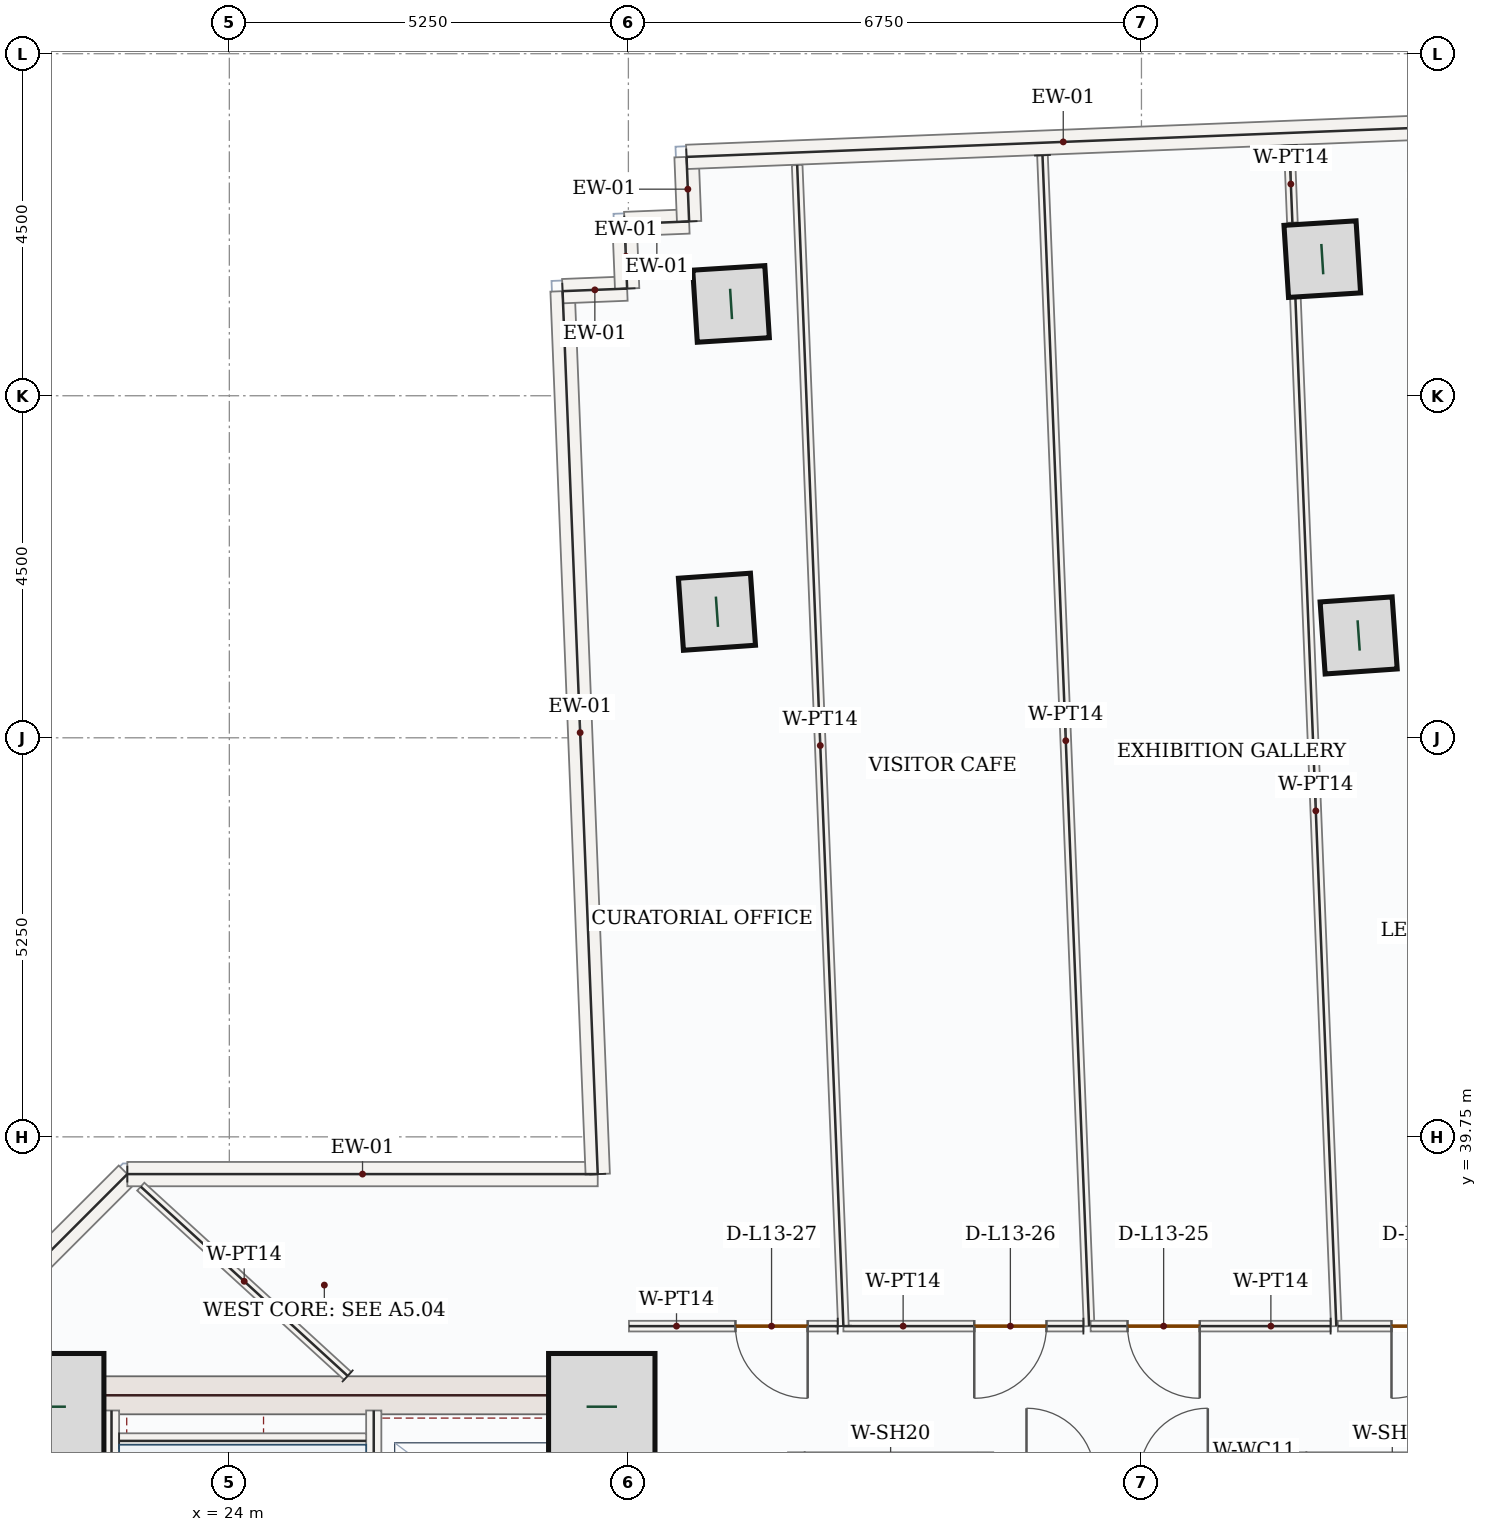
"""IFC4 building model, lengths in metres.
Left out: names, types, materials, properties, quantities, classifications, styles, units other than length and angle.
Written with IfcOpenShell. Run it as: python <this file> out.ifc"""

import sys

from ifc_helpers import new_model, si_unit, direction, frame, frame_2d, origin, origin_2d, place, context, subcontext, project, spatial, rectangle, hollow_rectangle, extrude, source, transform, mapped, element, fill, save


model = new_model("IFC4")
c1 = context("Model", 3, precision=1e-05, world=origin(), true_north=direction((0.0, 1.0)))
c2 = subcontext(c1, "Body", "Model", "MODEL_VIEW")
j1 = project(units=[si_unit("LENGTHUNIT", "METRE"), si_unit("PLANEANGLEUNIT", "RADIAN")], contexts=[c1])
p1 = place(None, origin())
s1 = spatial("IfcSite", under=j1, at=p1, CompositionType="ELEMENT")
p2 = place(p1, origin())
s2 = spatial("IfcBuilding", under=s1, at=p2, CompositionType="ELEMENT")
p3 = place(p2, frame((0.0, 0.0, 62.7)))
s3 = spatial("IfcBuildingStorey", under=s2, at=p3, CompositionType="ELEMENT", Elevation=62.7)
m1 = source(origin(), c2, "Body", "SweptSolid", [
    extrude(rectangle(XDim=8.55, YDim=0.5, at=frame_2d((4.275, 0.0))), origin(), (0.0, 0.0, 1.0), 3.95),
])
p4 = place(p3, frame((21.5, 28.05, 0.0), z_axis=(0.0, 0.0, 1.0), x_axis=(0.0, 1.0, 0.0)))
e1 = element("IfcWall", 1, at=p4, inside=s3, PredefinedType="SHEAR", context=c2, shape_type="MappedRepresentation", body=[
    mapped(m1, transform((0.0, 0.0, 0.0), x_axis=(1.0, 0.0, 0.0), y_axis=(0.0, 1.0, 0.0), z_axis=(0.0, 0.0, 1.0), scale=1.0)),
])
p5 = place(p3, frame((29.0, 28.05, 0.0), z_axis=(0.0, 0.0, 1.0), x_axis=(0.0, 1.0, 0.0)))
e2 = element("IfcWall", 2, at=p5, inside=s3, PredefinedType="SHEAR", context=c2, shape_type="SweptSolid", body=[
    extrude(rectangle(XDim=8.55, YDim=0.5, at=frame_2d((4.275, 0.0))), origin(), (0.0, 0.0, 1.0), 3.95),
])
p6 = place(p5, frame((1.5, 0.0, 0.0)))
e3 = element("IfcOpeningElement", 3, at=p6, cuts=e2, PredefinedType="OPENING", context=c2, shape_type="SweptSolid", body=[
    extrude(rectangle(XDim=1.1, YDim=2.2, at=frame_2d((0.55, 1.1))), frame((0.0, 0.26, 0.0), z_axis=(0.0, -1.0, 0.0), x_axis=(1.0, 0.0, 0.0)), (0.0, 0.0, 1.0), 0.52),
])
m2 = source(origin(), c2, "Body", "SweptSolid", [
    extrude(rectangle(XDim=7.0, YDim=0.5, at=frame_2d((3.5, 0.0))), origin(), (0.0, 0.0, 1.0), 3.95),
])
p7 = place(p3, frame((21.75, 36.35, 0.0), z_axis=(0.0, 0.0, 1.0), x_axis=(1.0, 0.0, 0.0)))
e4 = element("IfcWall", 4, at=p7, inside=s3, PredefinedType="SHEAR", context=c2, shape_type="MappedRepresentation", body=[
    mapped(m2, transform((0.0, 0.0, 0.0), x_axis=(1.0, 0.0, 0.0), y_axis=(0.0, 1.0, 0.0), z_axis=(0.0, 0.0, 1.0), scale=1.0)),
])
m3 = source(origin(), c2, "Body", "SweptSolid", [
    extrude(rectangle(XDim=1.4, YDim=1.4, at=origin_2d()), origin(), (0.0, 0.0, 1.0), 4.2),
])
for number, where, z_axis, x_axis in (
    (5, (21.65, 36.2, 0.0), (0.0, 0.0, 1.0), (1.0, 0.0, 0.0)),
    (6, (28.9, 36.2, 0.0), (0.0, 0.0, 1.0), (1.0, 0.0, 0.0)),
):
    element("IfcColumn", number, at=place(p3, frame(where, z_axis=z_axis, x_axis=x_axis)), inside=s3, PredefinedType="COLUMN", context=c2, shape_type="MappedRepresentation", body=[
        mapped(m3, transform((0.0, 0.0, 0.0), x_axis=(1.0, 0.0, 0.0), y_axis=(0.0, 1.0, 0.0), z_axis=(0.0, 0.0, 1.0), scale=1.0)),
    ])
m4 = source(origin(), c2, "Body", "SweptSolid", [
    extrude(hollow_rectangle(XDim=0.95, YDim=0.95, WallThickness=0.05, at=origin_2d()), origin(), (0.0, 0.0, 1.0), 4.2),
])
for number, where, z_axis, x_axis in (
    (7, (38.857, 46.346, 0.0), (0.0, 0.0, 1.0), (-0.07, 0.998, 0.0)),
    (8, (30.415, 46.658, 0.0), (0.0, 0.0, 1.0), (-0.07, 0.998, 0.0)),
    (9, (38.379, 51.297, 0.0), (0.0, 0.0, 1.0), (-0.063, 0.998, 0.0)),
    (10, (30.601, 50.708, 0.0), (0.0, 0.0, 1.0), (-0.063, 0.998, 0.0)),
):
    element("IfcColumn", number, at=place(p3, frame(where, z_axis=z_axis, x_axis=x_axis)), inside=s3, PredefinedType="COLUMN", context=c2, shape_type="MappedRepresentation", body=[
        mapped(m4, transform((0.0, 0.0, 0.0), x_axis=(1.0, 0.0, 0.0), y_axis=(0.0, 1.0, 0.0), z_axis=(0.0, 0.0, 1.0), scale=1.0)),
    ])
m5 = source(origin(), c2, "Body", "SweptSolid", [
    extrude(rectangle(XDim=5.258, YDim=0.32, at=frame_2d((2.629, 0.0))), origin(), (0.0, 0.0, 1.0), 3.95),
])
p8 = place(p3, frame((18.94, 35.542, 0.0), z_axis=(0.0, 0.0, 1.0), x_axis=(0.707106781187, 0.707106781187, 0.0)))
e11 = element("IfcWall", 11, at=p8, inside=s3, PredefinedType="SOLIDWALL", context=c2, shape_type="MappedRepresentation", body=[
    mapped(m5, transform((0.0, 0.0, 0.0), x_axis=(1.0, 0.0, 0.0), y_axis=(0.0, 1.0, 0.0), z_axis=(0.0, 0.0, 1.0), scale=1.0)),
])
m6 = source(origin(), c2, "Body", "SweptSolid", [
    extrude(rectangle(XDim=6.189, YDim=0.32, at=frame_2d((3.094, 0.0))), origin(), (0.0, 0.0, 1.0), 3.95),
])
p9 = place(p3, frame((22.658, 39.26, 0.0), z_axis=(0.0, 0.0, 1.0), x_axis=(1.0, 0.0, 0.0)))
e12 = element("IfcWall", 12, at=p9, inside=s3, PredefinedType="SOLIDWALL", context=c2, shape_type="MappedRepresentation", body=[
    mapped(m6, transform((0.0, 0.0, 0.0), x_axis=(1.0, 0.0, 0.0), y_axis=(0.0, 1.0, 0.0), z_axis=(0.0, 0.0, 1.0), scale=1.0)),
])
m7 = source(origin(), c2, "Body", "SweptSolid", [
    extrude(rectangle(XDim=11.625, YDim=0.32, at=frame_2d((5.812, 0.0))), origin(), (0.0, 0.0, 1.0), 3.95),
])
p10 = place(p3, frame((28.847, 39.26, 0.0), z_axis=(0.0, 0.0, 1.0), x_axis=(-0.039775975357, 0.999208622753, 0.0)))
e13 = element("IfcWall", 13, at=p10, inside=s3, PredefinedType="SOLIDWALL", context=c2, shape_type="MappedRepresentation", body=[
    mapped(m7, transform((0.0, 0.0, 0.0), x_axis=(1.0, 0.0, 0.0), y_axis=(0.0, 1.0, 0.0), z_axis=(0.0, 0.0, 1.0), scale=1.0)),
])
m8 = source(origin(), c2, "Body", "SweptSolid", [
    extrude(rectangle(XDim=0.85, YDim=0.32, at=frame_2d((0.425, 0.0))), origin(), (0.0, 0.0, 1.0), 3.95),
])
for number, where, z_axis, x_axis in (
    (14, (28.384, 50.876, 0.0), (0.0, 0.0, 1.0), (0.999, 0.04, 0.0)),
    (15, (29.233, 50.91, 0.0), (0.0, 0.0, 1.0), (-0.04, 0.999, 0.0)),
):
    element("IfcWall", number, at=place(p3, frame(where, z_axis=z_axis, x_axis=x_axis)), inside=s3, PredefinedType="SOLIDWALL", context=c2, shape_type="MappedRepresentation", body=[
        mapped(m8, transform((0.0, 0.0, 0.0), x_axis=(1.0, 0.0, 0.0), y_axis=(0.0, 1.0, 0.0), z_axis=(0.0, 0.0, 1.0), scale=1.0)),
    ])
m9 = source(origin(), c2, "Body", "SweptSolid", [
    extrude(rectangle(XDim=0.85, YDim=0.32, at=frame_2d((0.425, 0.0))), origin(), (0.0, 0.0, 1.0), 3.95),
])
p11 = place(p3, frame((29.2, 51.759, 0.0), z_axis=(0.0, 0.0, 1.0), x_axis=(0.999202792875, 0.039922158152, 0.0)))
e16 = element("IfcWall", 16, at=p11, inside=s3, PredefinedType="SOLIDWALL", context=c2, shape_type="MappedRepresentation", body=[
    mapped(m9, transform((0.0, 0.0, 0.0), x_axis=(1.0, 0.0, 0.0), y_axis=(0.0, 1.0, 0.0), z_axis=(0.0, 0.0, 1.0), scale=1.0)),
])
p12 = place(p3, frame((30.049, 51.793, 0.0), z_axis=(0.0, 0.0, 1.0), x_axis=(-0.039933618331, 0.999202334929, 0.0)))
e17 = element("IfcWall", 17, at=p12, inside=s3, PredefinedType="SOLIDWALL", context=c2, shape_type="MappedRepresentation", body=[
    mapped(m8, transform((0.0, 0.0, 0.0), x_axis=(1.0, 0.0, 0.0), y_axis=(0.0, 1.0, 0.0), z_axis=(0.0, 0.0, 1.0), scale=1.0)),
])
m10 = source(origin(), c2, "Body", "SweptSolid", [
    extrude(rectangle(XDim=9.92, YDim=0.32, at=frame_2d((4.96, 0.0))), origin(), (0.0, 0.0, 1.0), 3.95),
])
p13 = place(p3, frame((30.015, 52.642, 0.0), z_axis=(0.0, 0.0, 1.0), x_axis=(0.999207823998, 0.039796035749, 0.0)))
e18 = element("IfcWall", 18, at=p13, inside=s3, PredefinedType="SOLIDWALL", context=c2, shape_type="MappedRepresentation", body=[
    mapped(m10, transform((0.0, 0.0, 0.0), x_axis=(1.0, 0.0, 0.0), y_axis=(0.0, 1.0, 0.0), z_axis=(0.0, 0.0, 1.0), scale=1.0)),
])
m11 = source(origin(), c2, "Body", "SweptSolid", [
    extrude(rectangle(XDim=7.87, YDim=0.2, at=frame_2d((3.935, 0.0))), origin(), (0.0, 0.0, 1.0), 3.95),
])
p14 = place(p3, frame((22.45, 28.28, 0.0), z_axis=(0.0, 0.0, 1.0), x_axis=(0.0, 1.0, 0.0)))
e19 = element("IfcWall", 19, at=p14, inside=s3, PredefinedType="SOLIDWALL", context=c2, shape_type="MappedRepresentation", body=[
    mapped(m11, transform((0.0, 0.0, 0.0), x_axis=(1.0, 0.0, 0.0), y_axis=(0.0, 1.0, 0.0), z_axis=(0.0, 0.0, 1.0), scale=1.0)),
])
p15 = place(p3, frame((25.9, 28.15, 0.0), z_axis=(0.0, 0.0, 1.0), x_axis=(0.0, 1.0, 0.0)))
e20 = element("IfcWall", 20, at=p15, inside=s3, PredefinedType="SOLIDWALL", context=c2, shape_type="SweptSolid", body=[
    extrude(rectangle(XDim=8.0, YDim=0.2, at=frame_2d((4.0, 0.0))), origin(), (0.0, 0.0, 1.0), 3.95),
])
p16 = place(p15, frame((0.4, 0.0, 0.0)))
e21 = element("IfcOpeningElement", 21, at=p16, cuts=e20, PredefinedType="OPENING", context=c2, shape_type="SweptSolid", body=[
    extrude(rectangle(XDim=1.05, YDim=2.15, at=frame_2d((0.525, 1.075))), frame((0.0, 0.11, 0.0), z_axis=(0.0, -1.0, 0.0), x_axis=(1.0, 0.0, 0.0)), (0.0, 0.0, 1.0), 0.22),
])
m12 = source(origin(), c2, "Body", "SweptSolid", [
    extrude(rectangle(XDim=3.25, YDim=0.2, at=frame_2d((1.625, 0.0))), origin(), (0.0, 0.0, 1.0), 3.95),
])
p17 = place(p3, frame((22.55, 35.75, 0.0), z_axis=(0.0, 0.0, 1.0), x_axis=(1.0, 0.0, 0.0)))
e22 = element("IfcWall", 22, at=p17, inside=s3, PredefinedType="SOLIDWALL", context=c2, shape_type="MappedRepresentation", body=[
    mapped(m12, transform((0.0, 0.0, 0.0), x_axis=(1.0, 0.0, 0.0), y_axis=(0.0, 1.0, 0.0), z_axis=(0.0, 0.0, 1.0), scale=1.0)),
])
m13 = source(origin(), c2, "Body", "SweptSolid", [
    extrude(rectangle(XDim=2.4, YDim=0.2, at=frame_2d((1.2, 0.0))), origin(), (0.0, 0.0, 1.0), 3.95),
])
for number, where, z_axis, x_axis in (
    (23, (31.45, 33.2, 0.0), (0.0, 0.0, 1.0), (0.0, 1.0, 0.0)),
    (24, (33.95, 33.2, 0.0), (0.0, 0.0, 1.0), (0.0, 1.0, 0.0)),
    (25, (38.05, 33.2, 0.0), (0.0, 0.0, 1.0), (0.0, 1.0, 0.0)),
):
    element("IfcWall", number, at=place(p3, frame(where, z_axis=z_axis, x_axis=x_axis)), inside=s3, PredefinedType="SOLIDWALL", context=c2, shape_type="MappedRepresentation", body=[
        mapped(m13, transform((0.0, 0.0, 0.0), x_axis=(1.0, 0.0, 0.0), y_axis=(0.0, 1.0, 0.0), z_axis=(0.0, 0.0, 1.0), scale=1.0)),
    ])
m14 = source(origin(), c2, "Body", "SweptSolid", [
    extrude(rectangle(XDim=15.416, YDim=0.14, at=frame_2d((7.708, 0.0))), origin(), (0.0, 0.0, 1.0), 3.95),
])
p18 = place(p3, frame((34.698, 52.664, 0.0), z_axis=(0.0, 0.0, 1.0), x_axis=(0.039782723686, -0.999208354096, 0.0)))
e26 = element("IfcWall", 26, at=p18, inside=s3, PredefinedType="PARTITIONING", context=c2, shape_type="MappedRepresentation", body=[
    mapped(m14, transform((0.0, 0.0, 0.0), x_axis=(1.0, 0.0, 0.0), y_axis=(0.0, 1.0, 0.0), z_axis=(0.0, 0.0, 1.0), scale=1.0)),
])
p19 = place(p3, frame((35.236, 37.26, 0.0), z_axis=(0.0, 0.0, 1.0), x_axis=(-1.0, 0.0, 0.0)))
e27 = element("IfcWall", 27, at=p19, inside=s3, PredefinedType="PARTITIONING", context=c2, shape_type="SweptSolid", body=[
    extrude(rectangle(XDim=3.157, YDim=0.14, at=frame_2d((1.579, 0.0))), origin(), (0.0, 0.0, 1.0), 3.95),
])
p20 = place(p19, frame((0.486, 0.0, 0.0)))
e28 = element("IfcOpeningElement", 28, at=p20, cuts=e27, PredefinedType="OPENING", context=c2, shape_type="SweptSolid", body=[
    extrude(rectangle(XDim=0.95, YDim=2.15, at=frame_2d((0.475, 1.075))), frame((0.0, 0.08, 0.0), z_axis=(0.0, -1.0, 0.0), x_axis=(1.0, 0.0, 0.0)), (0.0, 0.0, 1.0), 0.16),
])
m15 = source(origin(), c2, "Body", "SweptSolid", [
    extrude(rectangle(XDim=15.286, YDim=0.14, at=frame_2d((7.643, 0.0))), origin(), (0.0, 0.0, 1.0), 3.95),
])
p21 = place(p3, frame((32.079, 37.261, 0.0), z_axis=(0.0, 0.0, 1.0), x_axis=(-0.039769031662, 0.99920889914, 0.0)))
e29 = element("IfcWall", 29, at=p21, inside=s3, PredefinedType="PARTITIONING", context=c2, shape_type="MappedRepresentation", body=[
    mapped(m15, transform((0.0, 0.0, 0.0), x_axis=(1.0, 0.0, 0.0), y_axis=(0.0, 1.0, 0.0), z_axis=(0.0, 0.0, 1.0), scale=1.0)),
])
m16 = source(origin(), c2, "Body", "SweptSolid", [
    extrude(rectangle(XDim=1.016, YDim=0.14, at=frame_2d((0.508, 0.0))), origin(), (0.0, 0.0, 1.0), 3.95),
])
p22 = place(p3, frame((37.945, 52.793, 0.0), z_axis=(0.0, 0.0, 1.0), x_axis=(0.03988168596, -0.99920440908, 0.0)))
e30 = element("IfcWall", 30, at=p22, inside=s3, PredefinedType="PARTITIONING", context=c2, shape_type="MappedRepresentation", body=[
    mapped(m16, transform((0.0, 0.0, 0.0), x_axis=(1.0, 0.0, 0.0), y_axis=(0.0, 1.0, 0.0), z_axis=(0.0, 0.0, 1.0), scale=1.0)),
])
m17 = source(origin(), c2, "Body", "SweptSolid", [
    extrude(rectangle(XDim=13.568, YDim=0.14, at=frame_2d((6.784, 0.0))), origin(), (0.0, 0.0, 1.0), 3.95),
])
p23 = place(p3, frame((38.024, 50.817, 0.0), z_axis=(0.0, 0.0, 1.0), x_axis=(0.039766111253, -0.99920901537, 0.0)))
e31 = element("IfcWall", 31, at=p23, inside=s3, PredefinedType="PARTITIONING", context=c2, shape_type="MappedRepresentation", body=[
    mapped(m17, transform((0.0, 0.0, 0.0), x_axis=(1.0, 0.0, 0.0), y_axis=(0.0, 1.0, 0.0), z_axis=(0.0, 0.0, 1.0), scale=1.0)),
])
p24 = place(p3, frame((38.489, 37.26, 0.0), z_axis=(0.0, 0.0, 1.0), x_axis=(-1.0, 0.0, 0.0)))
e32 = element("IfcWall", 32, at=p24, inside=s3, PredefinedType="PARTITIONING", context=c2, shape_type="SweptSolid", body=[
    extrude(rectangle(XDim=3.157, YDim=0.14, at=frame_2d((1.579, 0.0))), origin(), (0.0, 0.0, 1.0), 3.95),
])
p25 = place(p24, frame((1.722, 0.0, 0.0)))
e33 = element("IfcOpeningElement", 33, at=p25, cuts=e32, PredefinedType="OPENING", context=c2, shape_type="SweptSolid", body=[
    extrude(rectangle(XDim=0.95, YDim=2.15, at=frame_2d((0.475, 1.075))), frame((0.0, 0.08, 0.0), z_axis=(0.0, -1.0, 0.0), x_axis=(1.0, 0.0, 0.0)), (0.0, 0.0, 1.0), 0.16),
])
p26 = place(p3, frame((32.004, 37.26, 0.0), z_axis=(0.0, 0.0, 1.0), x_axis=(-0.999999996048, -8.8904694e-05, 0.0)))
e34 = element("IfcWall", 34, at=p26, inside=s3, PredefinedType="PARTITIONING", context=c2, shape_type="SweptSolid", body=[
    extrude(rectangle(XDim=2.746, YDim=0.14, at=frame_2d((1.373, 0.0))), origin(), (0.0, 0.0, 1.0), 3.95),
])
p27 = place(p26, frame((0.395, 0.0, 0.0)))
e35 = element("IfcOpeningElement", 35, at=p27, cuts=e34, PredefinedType="OPENING", context=c2, shape_type="SweptSolid", body=[
    extrude(rectangle(XDim=0.95, YDim=2.15, at=frame_2d((0.475, 1.075))), frame((0.0, 0.08, 0.0), z_axis=(0.0, -1.0, 0.0), x_axis=(1.0, 0.0, 0.0)), (0.0, 0.0, 1.0), 0.16),
])
m18 = source(origin(), c2, "Body", "SweptSolid", [
    extrude(rectangle(XDim=3.689, YDim=0.14, at=frame_2d((1.844, 0.0))), origin(), (0.0, 0.0, 1.0), 3.95),
])
p28 = place(p3, frame((25.557, 36.605, 0.0), z_axis=(0.0, 0.0, 1.0), x_axis=(-0.737843279395, 0.674972069831, 0.0)))
e36 = element("IfcWall", 36, at=p28, inside=s3, PredefinedType="PARTITIONING", context=c2, shape_type="MappedRepresentation", body=[
    mapped(m18, transform((0.0, 0.0, 0.0), x_axis=(1.0, 0.0, 0.0), y_axis=(0.0, 1.0, 0.0), z_axis=(0.0, 0.0, 1.0), scale=1.0)),
])
p29 = place(p3, frame((42.742, 37.26, 0.0), z_axis=(0.0, 0.0, 1.0), x_axis=(-0.999999998277, 5.8706117e-05, 0.0)))
e37 = element("IfcWall", 37, at=p29, inside=s3, PredefinedType="PARTITIONING", context=c2, shape_type="SweptSolid", body=[
    extrude(rectangle(XDim=4.159, YDim=0.14, at=frame_2d((2.079, 0.0))), origin(), (0.0, 0.0, 1.0), 3.95),
])
p30 = place(p29, frame((2.503, 0.0, 0.0)))
e38 = element("IfcOpeningElement", 38, at=p30, cuts=e37, PredefinedType="OPENING", context=c2, shape_type="SweptSolid", body=[
    extrude(rectangle(XDim=0.95, YDim=2.15, at=frame_2d((0.475, 1.075))), frame((0.0, 0.08, 0.0), z_axis=(0.0, -1.0, 0.0), x_axis=(1.0, 0.0, 0.0)), (0.0, 0.0, 1.0), 0.16),
])
m19 = source(origin(), c2, "Body", "SweptSolid", [
    extrude(rectangle(XDim=0.95, YDim=2.15, at=frame_2d((0.475, 1.075))), frame((0.0, 0.025, 0.0), z_axis=(0.0, -1.0, 0.0), x_axis=(1.0, 0.0, 0.0)), (0.0, 0.0, 1.0), 0.05),
])
p31 = place(p30, origin())
e39 = element("IfcDoor", 39, at=p31, inside=s3, OperationType="SINGLE_SWING_RIGHT", PredefinedType="DOOR", context=c2, shape_type="MappedRepresentation", body=[
    mapped(m19, transform((0.0, 0.0, 0.0), x_axis=(1.0, 0.0, 0.0), y_axis=(0.0, 1.0, 0.0), z_axis=(0.0, 0.0, 1.0), scale=1.0)),
])
fill(e38, e39)
p32 = place(p25, origin())
e40 = element("IfcDoor", 40, at=p32, inside=s3, OperationType="SINGLE_SWING_LEFT", PredefinedType="DOOR", context=c2, shape_type="MappedRepresentation", body=[
    mapped(m19, transform((0.0, 0.0, 0.0), x_axis=(1.0, 0.0, 0.0), y_axis=(0.0, 1.0, 0.0), z_axis=(0.0, 0.0, 1.0), scale=1.0)),
])
fill(e33, e40)
p33 = place(p20, origin())
e41 = element("IfcDoor", 41, at=p33, inside=s3, OperationType="SINGLE_SWING_RIGHT", PredefinedType="DOOR", context=c2, shape_type="MappedRepresentation", body=[
    mapped(m19, transform((0.0, 0.0, 0.0), x_axis=(1.0, 0.0, 0.0), y_axis=(0.0, 1.0, 0.0), z_axis=(0.0, 0.0, 1.0), scale=1.0)),
])
fill(e28, e41)
p34 = place(p27, origin())
e42 = element("IfcDoor", 42, at=p34, inside=s3, OperationType="SINGLE_SWING_LEFT", PredefinedType="DOOR", context=c2, shape_type="MappedRepresentation", body=[
    mapped(m19, transform((0.0, 0.0, 0.0), x_axis=(1.0, 0.0, 0.0), y_axis=(0.0, 1.0, 0.0), z_axis=(0.0, 0.0, 1.0), scale=1.0)),
])
fill(e35, e42)
save(model, sys.argv[1])
